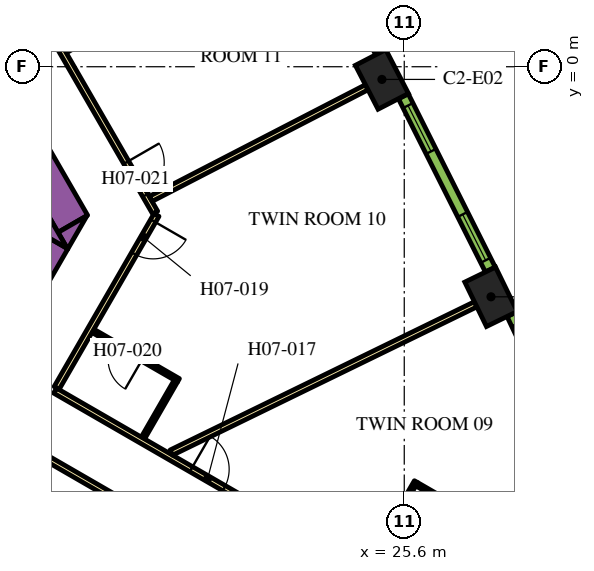
"""IFC4 building model, lengths in metres.
Left out: names, types, materials, properties, quantities, classifications, styles, units other than length and angle.
Written with IfcOpenShell. Run it as: python <this file> out.ifc"""

import sys

from ifc_helpers import new_model, si_unit, direction, frame, frame_2d, origin, origin_2d, place, context, subcontext, project, spatial, polyline, rectangle, outline, extrude, element, fill, save


model = new_model("IFC4")
c1 = context("Model", 3, precision=1e-05, world=origin(), true_north=direction((0.0, 1.0)))
c2 = subcontext(c1, "Body", "Model", "MODEL_VIEW")
j1 = project(units=[si_unit("LENGTHUNIT", "METRE"), si_unit("PLANEANGLEUNIT", "RADIAN")], contexts=[c1])
p1 = place(None, origin())
s1 = spatial("IfcSite", under=j1, at=p1, CompositionType="ELEMENT")
p2 = place(p1, origin())
s2 = spatial("IfcBuilding", under=s1, at=p2, CompositionType="ELEMENT")
p3 = place(p2, frame((0.0, 0.0, 103.2)))
s3 = spatial("IfcBuildingStorey", under=s2, at=p3, CompositionType="ELEMENT", Elevation=103.2)
for number, where, z_axis, x_axis in (
    (1, (27.883, -6.054, 0.0), (0.0, 0.0, 1.0), (-0.438, 0.899, 0.0)),
    (2, (25.012, -0.334, 0.0), (0.0, 0.0, 1.0), (-0.459, 0.888, 0.0)),
):
    element("IfcColumn", number, at=place(p3, frame(where, z_axis=z_axis, x_axis=x_axis)), inside=s3, PredefinedType="COLUMN", context=c2, shape_type="SweptSolid", body=[
        extrude(rectangle(XDim=1.3, YDim=0.9, at=origin_2d()), origin(), (0.0, 0.0, 1.0), 3.9),
    ])
p4 = place(p3, frame((6.711, 13.476, 0.0), z_axis=(0.0, 0.0, 1.0), x_axis=(0.500002723396, -0.866023831425, 0.0)))
e3 = element("IfcWall", 3, at=p4, inside=s3, PredefinedType="SOLIDWALL", context=c2, shape_type="SweptSolid", body=[
    extrude(rectangle(XDim=20.334, YDim=0.9, at=frame_2d((10.167, 0.0))), origin(), (0.0, 0.0, 1.0), 3.9),
])
p5 = place(p3, origin())
e4 = element("IfcWall", 4, at=p5, inside=s3, PredefinedType="SOLIDWALL", context=c2, shape_type="SweptSolid", body=[
    extrude(outline(polyline([(16.743, -4.8), (16.489, -4.36), (17.251, -3.92), (16.743, -4.8)])), origin(), (0.0, 0.0, 1.0), 3.9),
])
p6 = place(p3, frame((11.695, -12.644, 0.0), z_axis=(0.0, 0.0, 1.0), x_axis=(0.500010229568, 0.86601949766, 0.0)))
e5 = element("IfcWall", 5, at=p6, inside=s3, PredefinedType="SOLIDWALL", context=c2, shape_type="SweptSolid", body=[
    extrude(rectangle(XDim=9.326, YDim=0.9, at=frame_2d((4.663, 0.0))), origin(), (0.0, 0.0, 1.0), 3.9),
])
e6 = element("IfcWall", 6, at=p5, inside=s3, PredefinedType="SOLIDWALL", context=c2, shape_type="SweptSolid", body=[
    extrude(outline(polyline([(16.223, -3.9), (16.732, -4.78), (15.969, -4.34), (16.223, -3.9)])), origin(), (0.0, 0.0, 1.0), 3.9),
])
p7 = place(p3, frame((16.412, -8.523, 0.0), z_axis=(0.0, 0.0, 1.0), x_axis=(0.866025629663, -0.499999608766, 0.0)))
e7 = element("IfcWall", 7, at=p7, inside=s3, PredefinedType="PARTITIONING", context=c2, shape_type="SweptSolid", body=[
    extrude(rectangle(XDim=13.624, YDim=0.15, at=frame_2d((6.812, 0.0))), origin(), (0.0, 0.0, 1.0), 2.75),
])
p8 = place(p7, frame((4.134, 0.0, 0.0)))
e8 = element("IfcOpeningElement", 8, at=p8, cuts=e7, PredefinedType="OPENING", context=c2, shape_type="SweptSolid", body=[
    extrude(rectangle(XDim=1.0, YDim=2.1, at=frame_2d((0.5, 1.05))), frame((0.0, 0.085, 0.0), z_axis=(0.0, -1.0, 0.0), x_axis=(1.0, 0.0, 0.0)), (0.0, 0.0, 1.0), 0.17),
])
p9 = place(p3, frame((19.081, -3.9, 0.0), z_axis=(0.0, 0.0, 1.0), x_axis=(-0.499974327079, -0.866040225545, 0.0)))
e9 = element("IfcWall", 9, at=p9, inside=s3, PredefinedType="PARTITIONING", context=c2, shape_type="SweptSolid", body=[
    extrude(rectangle(XDim=5.258, YDim=0.15, at=frame_2d((2.629, 0.0))), origin(), (0.0, 0.0, 1.0), 2.75),
])
p10 = place(p9, frame((0.18, 0.0, 0.0)))
e10 = element("IfcOpeningElement", 10, at=p10, cuts=e9, PredefinedType="OPENING", context=c2, shape_type="SweptSolid", body=[
    extrude(rectangle(XDim=1.0, YDim=2.1, at=frame_2d((0.5, 1.05))), frame((0.0, 0.085, 0.0), z_axis=(0.0, -1.0, 0.0), x_axis=(1.0, 0.0, 0.0)), (0.0, 0.0, 1.0), 0.17),
])
p11 = place(p3, frame((6.163, 18.475, 0.0), z_axis=(0.0, 0.0, 1.0), x_axis=(0.500001317485, -0.866024643133, 0.0)))
e11 = element("IfcWall", 11, at=p11, inside=s3, PredefinedType="PARTITIONING", context=c2, shape_type="SweptSolid", body=[
    extrude(rectangle(XDim=25.767, YDim=0.15, at=frame_2d((12.883, 0.0))), origin(), (0.0, 0.0, 1.0), 2.75),
])
p12 = place(p11, frame((24.241, 0.0, 0.0)))
e12 = element("IfcOpeningElement", 12, at=p12, cuts=e11, PredefinedType="OPENING", context=c2, shape_type="SweptSolid", body=[
    extrude(rectangle(XDim=1.0, YDim=2.1, at=frame_2d((0.5, 1.05))), frame((0.0, 0.085, 0.0), z_axis=(0.0, -1.0, 0.0), x_axis=(1.0, 0.0, 0.0)), (0.0, 0.0, 1.0), 0.17),
])
p13 = place(p11, frame((13.144, 0.0, 0.0)))
e13 = element("IfcOpeningElement", 13, at=p13, cuts=e11, PredefinedType="OPENING", context=c2, shape_type="SweptSolid", body=[
    extrude(rectangle(XDim=1.0, YDim=2.1, at=frame_2d((0.5, 1.05))), frame((0.0, 0.085, 0.0), z_axis=(0.0, -1.0, 0.0), x_axis=(1.0, 0.0, 0.0)), (0.0, 0.0, 1.0), 0.17),
])
p14 = place(p11, frame((11.592, 0.0, 0.0)))
e14 = element("IfcOpeningElement", 14, at=p14, cuts=e11, PredefinedType="OPENING", context=c2, shape_type="SweptSolid", body=[
    extrude(rectangle(XDim=1.1, YDim=2.1, at=frame_2d((0.55, 1.05))), frame((0.0, 0.085, 0.0), z_axis=(0.0, -1.0, 0.0), x_axis=(1.0, 0.0, 0.0)), (0.0, 0.0, 1.0), 0.17),
])
p15 = place(p11, frame((4.674, 0.0, 0.0)))
e15 = element("IfcOpeningElement", 15, at=p15, cuts=e11, PredefinedType="OPENING", context=c2, shape_type="SweptSolid", body=[
    extrude(rectangle(XDim=0.9, YDim=2.1, at=frame_2d((0.45, 1.05))), frame((0.0, 0.085, 0.0), z_axis=(0.0, -1.0, 0.0), x_axis=(1.0, 0.0, 0.0)), (0.0, 0.0, 1.0), 0.17),
])
p16 = place(p11, frame((2.411, 0.0, 0.0)))
e16 = element("IfcOpeningElement", 16, at=p16, cuts=e11, PredefinedType="OPENING", context=c2, shape_type="SweptSolid", body=[
    extrude(rectangle(XDim=1.0, YDim=2.1, at=frame_2d((0.5, 1.05))), frame((0.0, 0.085, 0.0), z_axis=(0.0, -1.0, 0.0), x_axis=(1.0, 0.0, 0.0)), (0.0, 0.0, 1.0), 0.17),
])
p17 = place(p3, frame((27.386, -16.764, 0.0), z_axis=(0.0, 0.0, 1.0), x_axis=(-0.866022585856, 0.500004880763, 0.0)))
e17 = element("IfcWall", 17, at=p17, inside=s3, PredefinedType="PARTITIONING", context=c2, shape_type="SweptSolid", body=[
    extrude(rectangle(XDim=13.544, YDim=0.15, at=frame_2d((6.772, 0.0))), origin(), (0.0, 0.0, 1.0), 2.75),
])
p18 = place(p17, frame((8.491, 0.0, 0.0)))
e18 = element("IfcOpeningElement", 18, at=p18, cuts=e17, PredefinedType="OPENING", context=c2, shape_type="SweptSolid", body=[
    extrude(rectangle(XDim=1.0, YDim=2.1, at=frame_2d((0.5, 1.05))), frame((0.0, 0.085, 0.0), z_axis=(0.0, -1.0, 0.0), x_axis=(1.0, 0.0, 0.0)), (0.0, 0.0, 1.0), 0.17),
])
p19 = place(p3, frame((24.613, -0.541, 0.0), z_axis=(0.0, 0.0, 1.0), x_axis=(-0.888459912519, -0.458954228487, 0.0)))
e19 = element("IfcWall", 19, at=p19, inside=s3, PredefinedType="PARTITIONING", context=c2, shape_type="SweptSolid", body=[
    extrude(rectangle(XDim=6.392, YDim=0.15, at=frame_2d((3.196, 0.0))), origin(), (0.0, 0.0, 1.0), 2.75),
])
p20 = place(p3, frame((27.479, -6.251, 0.0), z_axis=(0.0, 0.0, 1.0), x_axis=(-0.898945877276, -0.438059710231, 0.0)))
e20 = element("IfcWall", 20, at=p20, inside=s3, PredefinedType="PARTITIONING", context=c2, shape_type="SweptSolid", body=[
    extrude(rectangle(XDim=8.909, YDim=0.15, at=frame_2d((4.455, 0.0))), origin(), (0.0, 0.0, 1.0), 2.75),
])
p21 = place(p3, frame((25.91, -10.918, 0.0), z_axis=(0.0, 0.0, 1.0), x_axis=(-0.500006934395, -0.866021400173, 0.0)))
e21 = element("IfcWall", 21, at=p21, inside=s3, PredefinedType="PARTITIONING", context=c2, shape_type="SweptSolid", body=[
    extrude(rectangle(XDim=2.6, YDim=0.1, at=frame_2d((1.3, 0.0))), origin(), (0.0, 0.0, 1.0), 2.75),
])
p22 = place(p21, frame((1.1, 0.0, 0.0)))
e22 = element("IfcOpeningElement", 22, at=p22, cuts=e21, PredefinedType="OPENING", context=c2, shape_type="SweptSolid", body=[
    extrude(rectangle(XDim=0.9, YDim=2.1, at=frame_2d((0.45, 1.05))), frame((0.0, 0.06, 0.0), z_axis=(0.0, -1.0, 0.0), x_axis=(1.0, 0.0, 0.0)), (0.0, 0.0, 1.0), 0.12),
])
p23 = place(p3, frame((25.928, -10.986, 0.0), z_axis=(0.0, 0.0, 1.0), x_axis=(0.866025371046, -0.500000056704, 0.0)))
e23 = element("IfcWall", 23, at=p23, inside=s3, PredefinedType="PARTITIONING", context=c2, shape_type="SweptSolid", body=[
    extrude(rectangle(XDim=1.7, YDim=0.1, at=frame_2d((0.85, 0.0))), origin(), (0.0, 0.0, 1.0), 2.75),
])
p24 = place(p3, frame((19.659, -8.25, 0.0), z_axis=(0.0, 0.0, 1.0), x_axis=(-0.866021400173, 0.500006934395, 0.0)))
e24 = element("IfcWall", 24, at=p24, inside=s3, PredefinedType="PARTITIONING", context=c2, shape_type="SweptSolid", body=[
    extrude(rectangle(XDim=2.6, YDim=0.1, at=frame_2d((1.3, 0.0))), origin(), (0.0, 0.0, 1.0), 2.75),
])
p25 = place(p24, frame((1.1, 0.0, 0.0)))
e25 = element("IfcOpeningElement", 25, at=p25, cuts=e24, PredefinedType="OPENING", context=c2, shape_type="SweptSolid", body=[
    extrude(rectangle(XDim=0.9, YDim=2.1, at=frame_2d((0.45, 1.05))), frame((0.0, 0.06, 0.0), z_axis=(0.0, -1.0, 0.0), x_axis=(1.0, 0.0, 0.0)), (0.0, 0.0, 1.0), 0.12),
])
p26 = place(p3, frame((19.591, -8.268, 0.0), z_axis=(0.0, 0.0, 1.0), x_axis=(-0.500040090343, -0.866002256377, 0.0)))
e26 = element("IfcWall", 26, at=p26, inside=s3, PredefinedType="PARTITIONING", context=c2, shape_type="SweptSolid", body=[
    extrude(rectangle(XDim=1.73, YDim=0.1, at=frame_2d((0.865, 0.0))), origin(), (0.0, 0.0, 1.0), 2.75),
])
p27 = place(p3, frame((16.681, 0.407, 0.0), z_axis=(0.0, 0.0, 1.0), x_axis=(0.866021400173, 0.500006934395, 0.0)))
e27 = element("IfcWall", 27, at=p27, inside=s3, PredefinedType="PARTITIONING", context=c2, shape_type="SweptSolid", body=[
    extrude(rectangle(XDim=2.6, YDim=0.1, at=frame_2d((1.3, 0.0))), origin(), (0.0, 0.0, 1.0), 2.75),
])
p28 = place(p27, frame((0.6, 0.0, 0.0)))
e28 = element("IfcOpeningElement", 28, at=p28, cuts=e27, PredefinedType="OPENING", context=c2, shape_type="SweptSolid", body=[
    extrude(rectangle(XDim=0.9, YDim=2.1, at=frame_2d((0.45, 1.05))), frame((0.0, 0.06, 0.0), z_axis=(0.0, -1.0, 0.0), x_axis=(1.0, 0.0, 0.0)), (0.0, 0.0, 1.0), 0.12),
])
p29 = place(p3, frame((30.62, -11.127, 0.0), z_axis=(0.0, 0.0, 1.0), x_axis=(-0.427543726596, 0.903994669148, 0.0)))
e29 = element("IfcWall", 29, at=p29, inside=s3, PredefinedType="SOLIDWALL", context=c2, shape_type="SweptSolid", body=[
    extrude(rectangle(XDim=5.107, YDim=0.29, at=frame_2d((2.553, 0.0))), origin(), (0.0, 0.0, 1.0), 3.65),
])
p30 = place(p29, frame((0.24, 0.0, 0.9)))
e30 = element("IfcOpeningElement", 30, at=p30, cuts=e29, PredefinedType="OPENING", context=c2, shape_type="SweptSolid", body=[
    extrude(rectangle(XDim=1.35, YDim=2.15, at=frame_2d((0.675, 1.075))), frame((0.0, 0.155, 0.0), z_axis=(0.0, -1.0, 0.0), x_axis=(1.0, 0.0, 0.0)), (0.0, 0.0, 1.0), 0.31),
])
p31 = place(p29, frame((3.471, 0.0, 0.9)))
e31 = element("IfcOpeningElement", 31, at=p31, cuts=e29, PredefinedType="OPENING", context=c2, shape_type="SweptSolid", body=[
    extrude(rectangle(XDim=1.35, YDim=2.15, at=frame_2d((0.675, 1.075))), frame((0.0, 0.155, 0.0), z_axis=(0.0, -1.0, 0.0), x_axis=(1.0, 0.0, 0.0)), (0.0, 0.0, 1.0), 0.31),
])
p32 = place(p3, frame((27.864, -5.336, 0.0), z_axis=(0.0, 0.0, 1.0), x_axis=(-0.448534297211, 0.893765620409, 0.0)))
e32 = element("IfcWall", 32, at=p32, inside=s3, PredefinedType="SOLIDWALL", context=c2, shape_type="SweptSolid", body=[
    extrude(rectangle(XDim=5.1, YDim=0.29, at=frame_2d((2.55, 0.0))), origin(), (0.0, 0.0, 1.0), 3.65),
])
p33 = place(p32, frame((0.272, 0.0, 0.9)))
e33 = element("IfcOpeningElement", 33, at=p33, cuts=e32, PredefinedType="OPENING", context=c2, shape_type="SweptSolid", body=[
    extrude(rectangle(XDim=1.35, YDim=2.15, at=frame_2d((0.675, 1.075))), frame((0.0, 0.155, 0.0), z_axis=(0.0, -1.0, 0.0), x_axis=(1.0, 0.0, 0.0)), (0.0, 0.0, 1.0), 0.31),
])
p34 = place(p32, frame((3.478, 0.0, 0.9)))
e34 = element("IfcOpeningElement", 34, at=p34, cuts=e32, PredefinedType="OPENING", context=c2, shape_type="SweptSolid", body=[
    extrude(rectangle(XDim=1.35, YDim=2.15, at=frame_2d((0.675, 1.075))), frame((0.0, 0.155, 0.0), z_axis=(0.0, -1.0, 0.0), x_axis=(1.0, 0.0, 0.0)), (0.0, 0.0, 1.0), 0.31),
])
p35 = place(p3, frame((24.977, 0.383, 0.0), z_axis=(0.0, 0.0, 1.0), x_axis=(-0.469323203119, 0.883026461106, 0.0)))
e35 = element("IfcWall", 35, at=p35, inside=s3, PredefinedType="SOLIDWALL", context=c2, shape_type="SweptSolid", body=[
    extrude(rectangle(XDim=5.101, YDim=0.29, at=frame_2d((2.55, 0.0))), origin(), (0.0, 0.0, 1.0), 3.65),
])
p36 = place(p35, frame((0.273, 0.0, 0.9)))
e36 = element("IfcOpeningElement", 36, at=p36, cuts=e35, PredefinedType="OPENING", context=c2, shape_type="SweptSolid", body=[
    extrude(rectangle(XDim=1.35, YDim=2.15, at=frame_2d((0.675, 1.075))), frame((0.0, 0.155, 0.0), z_axis=(0.0, -1.0, 0.0), x_axis=(1.0, 0.0, 0.0)), (0.0, 0.0, 1.0), 0.31),
])
p37 = place(p35, frame((3.478, 0.0, 0.9)))
e37 = element("IfcOpeningElement", 37, at=p37, cuts=e35, PredefinedType="OPENING", context=c2, shape_type="SweptSolid", body=[
    extrude(rectangle(XDim=1.35, YDim=2.15, at=frame_2d((0.675, 1.075))), frame((0.0, 0.155, 0.0), z_axis=(0.0, -1.0, 0.0), x_axis=(1.0, 0.0, 0.0)), (0.0, 0.0, 1.0), 0.31),
])
p38 = place(p8, origin())
e38 = element("IfcDoor", 38, at=p38, inside=s3, OperationType="SINGLE_SWING_LEFT", PredefinedType="DOOR", context=c2, shape_type="SweptSolid", body=[
    extrude(rectangle(XDim=1.0, YDim=2.1, at=frame_2d((0.5, 1.05))), frame((0.0, 0.025, 0.0), z_axis=(0.0, -1.0, 0.0), x_axis=(1.0, 0.0, 0.0)), (0.0, 0.0, 1.0), 0.05),
])
fill(e8, e38)
p39 = place(p10, origin())
e39 = element("IfcDoor", 39, at=p39, inside=s3, OperationType="SINGLE_SWING_LEFT", PredefinedType="DOOR", context=c2, shape_type="SweptSolid", body=[
    extrude(rectangle(XDim=1.0, YDim=2.1, at=frame_2d((0.5, 1.05))), frame((0.0, 0.025, 0.0), z_axis=(0.0, -1.0, 0.0), x_axis=(1.0, 0.0, 0.0)), (0.0, 0.0, 1.0), 0.05),
])
fill(e10, e39)
p40 = place(p25, origin())
e40 = element("IfcDoor", 40, at=p40, inside=s3, OperationType="SINGLE_SWING_LEFT", PredefinedType="DOOR", context=c2, shape_type="SweptSolid", body=[
    extrude(rectangle(XDim=0.9, YDim=2.1, at=frame_2d((0.45, 1.05))), frame((0.0, 0.025, 0.0), z_axis=(0.0, -1.0, 0.0), x_axis=(1.0, 0.0, 0.0)), (0.0, 0.0, 1.0), 0.05),
])
fill(e25, e40)
p41 = place(p12, origin())
e41 = element("IfcDoor", 41, at=p41, inside=s3, OperationType="SINGLE_SWING_RIGHT", PredefinedType="DOOR", context=c2, shape_type="SweptSolid", body=[
    extrude(rectangle(XDim=1.0, YDim=2.1, at=frame_2d((0.5, 1.05))), frame((0.0, 0.025, 0.0), z_axis=(0.0, -1.0, 0.0), x_axis=(1.0, 0.0, 0.0)), (0.0, 0.0, 1.0), 0.05),
])
fill(e12, e41)
p42 = place(p33, origin())
e42 = element("IfcWindow", 42, at=p42, inside=s3, PartitioningType="DOUBLE_PANEL_VERTICAL", PredefinedType="WINDOW", context=c2, shape_type="SweptSolid", body=[
    extrude(rectangle(XDim=1.35, YDim=2.15, at=frame_2d((0.675, 1.075))), frame((0.0, 0.015, 0.0), z_axis=(0.0, -1.0, 0.0), x_axis=(1.0, 0.0, 0.0)), (0.0, 0.0, 1.0), 0.06),
])
fill(e33, e42)
p43 = place(p34, origin())
e43 = element("IfcWindow", 43, at=p43, inside=s3, PartitioningType="DOUBLE_PANEL_VERTICAL", PredefinedType="WINDOW", context=c2, shape_type="SweptSolid", body=[
    extrude(rectangle(XDim=1.35, YDim=2.15, at=frame_2d((0.675, 1.075))), frame((0.0, 0.015, 0.0), z_axis=(0.0, -1.0, 0.0), x_axis=(1.0, 0.0, 0.0)), (0.0, 0.0, 1.0), 0.06),
])
fill(e34, e43)
save(model, sys.argv[1])
